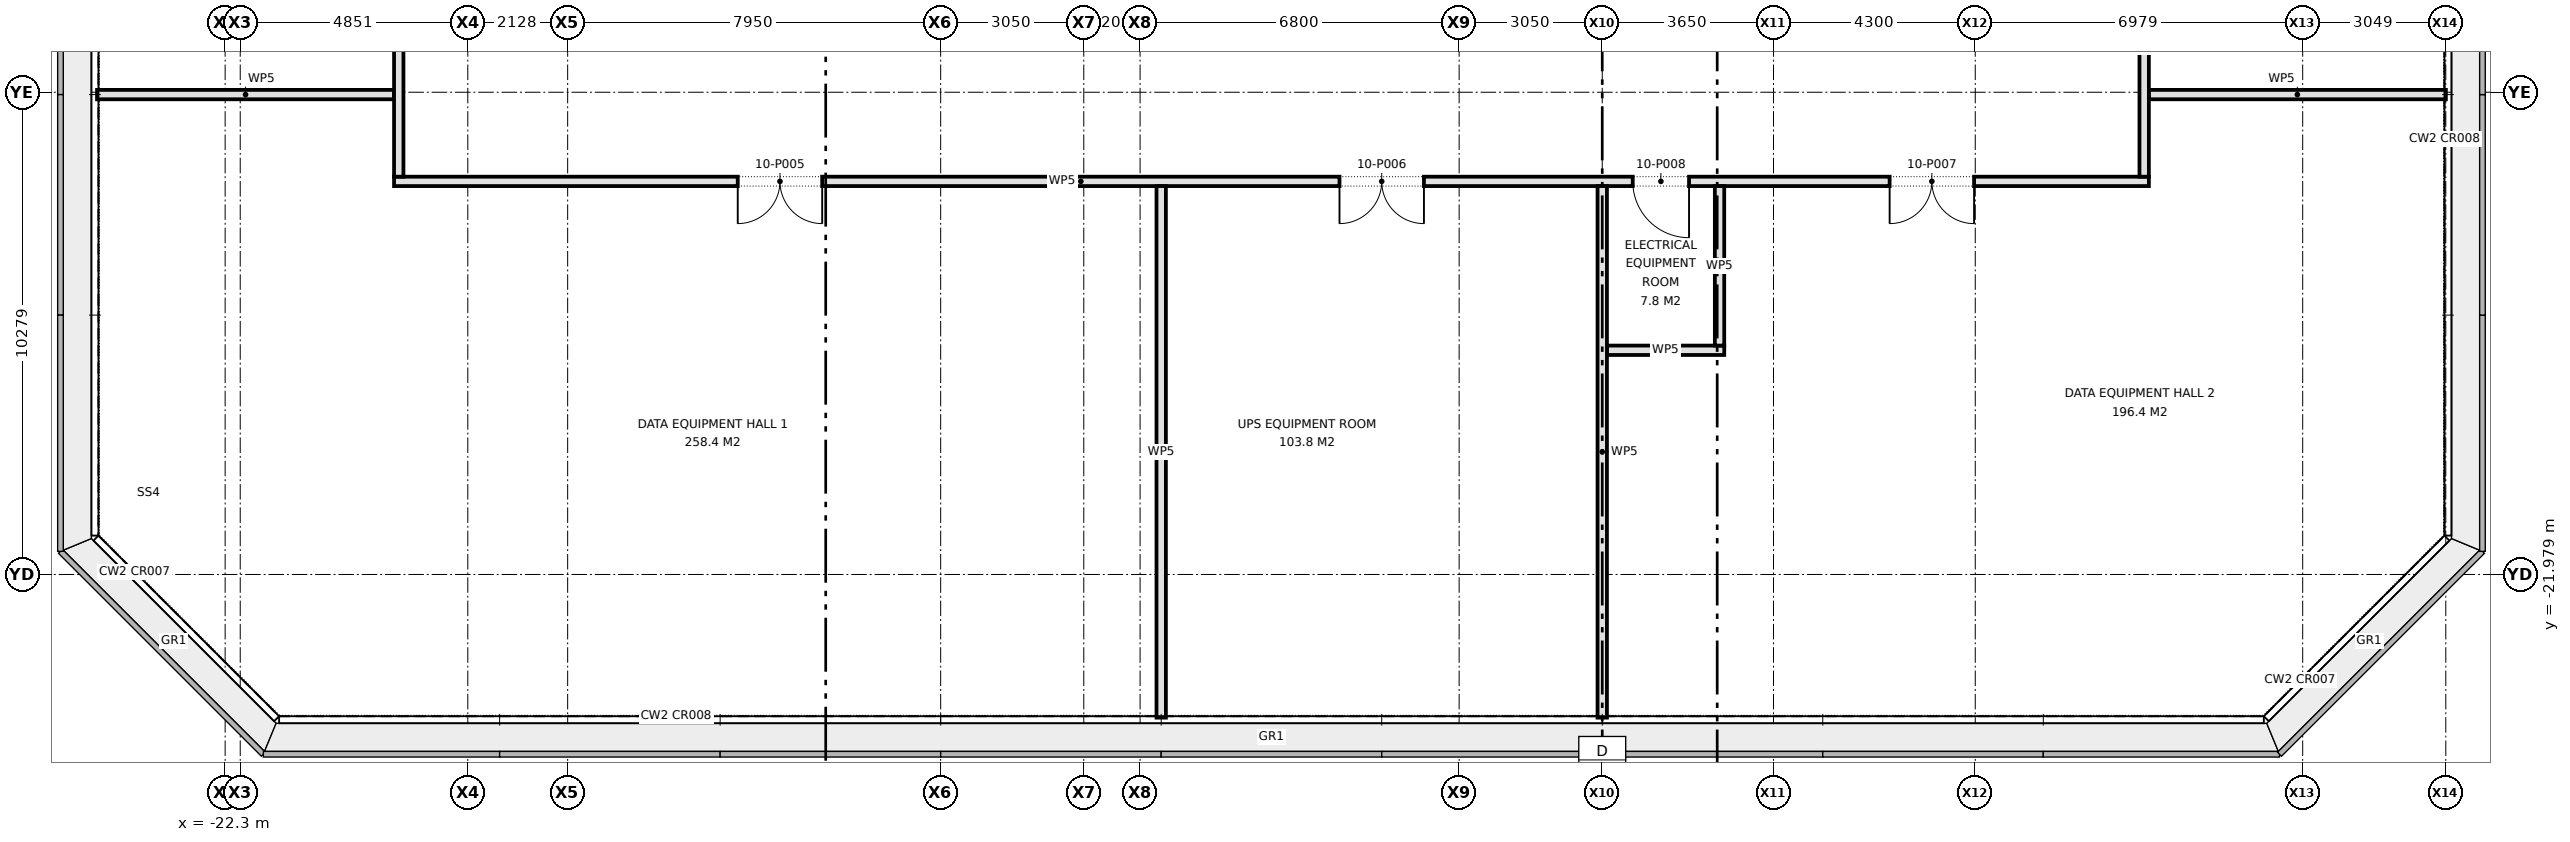
"""IFC4 building model, lengths in metres.
Left out: names, types, materials, properties, quantities, classifications, styles, units other than length and angle.
Written with IfcOpenShell. Run it as: python <this file> out.ifc"""

import sys

from ifc_helpers import new_model, si_unit, direction, frame, frame_2d, origin, place, context, subcontext, project, spatial, rectangle, extrude, element, fill, save


model = new_model("IFC4")
c1 = context("Model", 3, precision=1e-05, world=origin(), true_north=direction((0.0, 1.0)))
c2 = subcontext(c1, "Body", "Model", "MODEL_VIEW")
j1 = project(units=[si_unit("LENGTHUNIT", "METRE"), si_unit("PLANEANGLEUNIT", "RADIAN")], contexts=[c1])
p1 = place(None, origin())
s1 = spatial("IfcSite", under=j1, at=p1, CompositionType="ELEMENT")
p2 = place(p1, origin())
s2 = spatial("IfcBuilding", under=s1, at=p2, CompositionType="ELEMENT")
p3 = place(p2, frame((0.0, 0.0, 44.9)))
s3 = spatial("IfcBuildingStorey", under=s2, at=p3, CompositionType="ELEMENT", Elevation=44.9)
p4 = place(p3, frame((7.15, -17.2, 0.0), z_axis=(0.0, 0.0, 1.0), x_axis=(1.0, 0.0, 0.0)))
e1 = element("IfcWall", 1, at=p4, inside=s3, PredefinedType="PARTITIONING", context=c2, shape_type="SweptSolid", body=[
    extrude(rectangle(XDim=2.5, YDim=0.2, at=frame_2d((1.25, 0.0))), origin(), (0.0, 0.0, 1.0), 4.575),
])
p5 = place(p3, frame((-18.7, -13.6, 0.0), z_axis=(0.0, 0.0, 1.0), x_axis=(1.0, 0.0, 0.0)))
e2 = element("IfcWall", 2, at=p5, inside=s3, PredefinedType="PARTITIONING", context=c2, shape_type="SweptSolid", body=[
    extrude(rectangle(XDim=37.4, YDim=0.2, at=frame_2d((18.7, 0.0))), origin(), (0.0, 0.0, 1.0), 4.575),
])
p6 = place(p5, frame((7.325, 0.0, 0.0)))
e3 = element("IfcOpeningElement", 3, at=p6, cuts=e2, PredefinedType="OPENING", context=c2, shape_type="SweptSolid", body=[
    extrude(rectangle(XDim=1.8, YDim=2.1, at=frame_2d((0.9, 1.05))), frame((0.0, 0.11, 0.0), z_axis=(0.0, -1.0, 0.0), x_axis=(1.0, 0.0, 0.0)), (0.0, 0.0, 1.0), 0.22),
])
p7 = place(p5, frame((20.15, 0.0, 0.0)))
e4 = element("IfcOpeningElement", 4, at=p7, cuts=e2, PredefinedType="OPENING", context=c2, shape_type="SweptSolid", body=[
    extrude(rectangle(XDim=1.8, YDim=2.1, at=frame_2d((0.9, 1.05))), frame((0.0, 0.11, 0.0), z_axis=(0.0, -1.0, 0.0), x_axis=(1.0, 0.0, 0.0)), (0.0, 0.0, 1.0), 0.22),
])
p8 = place(p5, frame((31.875, 0.0, 0.0)))
e5 = element("IfcOpeningElement", 5, at=p8, cuts=e2, PredefinedType="OPENING", context=c2, shape_type="SweptSolid", body=[
    extrude(rectangle(XDim=1.8, YDim=2.1, at=frame_2d((0.9, 1.05))), frame((0.0, 0.11, 0.0), z_axis=(0.0, -1.0, 0.0), x_axis=(1.0, 0.0, 0.0)), (0.0, 0.0, 1.0), 0.22),
])
p9 = place(p5, frame((26.4, 0.0, 0.0)))
e6 = element("IfcOpeningElement", 6, at=p9, cuts=e2, PredefinedType="OPENING", context=c2, shape_type="SweptSolid", body=[
    extrude(rectangle(XDim=1.2, YDim=2.1, at=frame_2d((0.6, 1.05))), frame((0.0, 0.11, 0.0), z_axis=(0.0, -1.0, 0.0), x_axis=(1.0, 0.0, 0.0)), (0.0, 0.0, 1.0), 0.22),
])
for number, where, z_axis, x_axis in (
    (7, (-25.03, -11.75, 0.0), (0.0, 0.0, 1.0), (1.0, 0.0, 0.0)),
    (8, (18.7, -11.75, 0.0), (0.0, 0.0, 1.0), (1.0, 0.0, 0.0)),
):
    element("IfcWall", number, at=place(p3, frame(where, z_axis=z_axis, x_axis=x_axis)), inside=s3, PredefinedType="PARTITIONING", context=c2, shape_type="SweptSolid", body=[
        extrude(rectangle(XDim=6.33, YDim=0.2, at=frame_2d((3.165, 0.0))), origin(), (0.0, 0.0, 1.0), 4.575),
    ])
p10 = place(p3, frame((18.6, -13.5, 0.0), z_axis=(0.0, 0.0, 1.0), x_axis=(0.0, 1.0, 0.0)))
e9 = element("IfcWall", 9, at=p10, inside=s3, PredefinedType="PARTITIONING", context=c2, shape_type="SweptSolid", body=[
    extrude(rectangle(XDim=27.0, YDim=0.2, at=frame_2d((13.5, 0.0))), origin(), (0.0, 0.0, 1.0), 4.575),
])
p11 = place(p10, frame((5.55, 0.0, 0.0)))
e10 = element("IfcOpeningElement", 10, at=p11, cuts=e9, PredefinedType="OPENING", context=c2, shape_type="SweptSolid", body=[
    extrude(rectangle(XDim=1.8, YDim=2.1, at=frame_2d((0.9, 1.05))), frame((0.0, 0.11, 0.0), z_axis=(0.0, -1.0, 0.0), x_axis=(1.0, 0.0, 0.0)), (0.0, 0.0, 1.0), 0.22),
])
p12 = place(p10, frame((21.7, 0.0, 0.0)))
e11 = element("IfcOpeningElement", 11, at=p12, cuts=e9, PredefinedType="OPENING", context=c2, shape_type="SweptSolid", body=[
    extrude(rectangle(XDim=1.2, YDim=2.1, at=frame_2d((0.6, 1.05))), frame((0.0, 0.11, 0.0), z_axis=(0.0, -1.0, 0.0), x_axis=(1.0, 0.0, 0.0)), (0.0, 0.0, 1.0), 0.22),
])
p13 = place(p10, frame((12.15, 0.0, 0.0)))
e12 = element("IfcOpeningElement", 12, at=p13, cuts=e9, PredefinedType="OPENING", context=c2, shape_type="SweptSolid", body=[
    extrude(rectangle(XDim=1.0, YDim=2.1, at=frame_2d((0.5, 1.05))), frame((0.0, 0.11, 0.0), z_axis=(0.0, -1.0, 0.0), x_axis=(1.0, 0.0, 0.0)), (0.0, 0.0, 1.0), 0.22),
])
p14 = place(p10, frame((15.15, 0.0, 0.0)))
e13 = element("IfcOpeningElement", 13, at=p14, cuts=e9, PredefinedType="OPENING", context=c2, shape_type="SweptSolid", body=[
    extrude(rectangle(XDim=1.0, YDim=2.1, at=frame_2d((0.5, 1.05))), frame((0.0, 0.11, 0.0), z_axis=(0.0, -1.0, 0.0), x_axis=(1.0, 0.0, 0.0)), (0.0, 0.0, 1.0), 0.22),
])
p15 = place(p10, frame((17.75, 0.0, 0.0)))
e14 = element("IfcOpeningElement", 14, at=p15, cuts=e9, PredefinedType="OPENING", context=c2, shape_type="SweptSolid", body=[
    extrude(rectangle(XDim=1.0, YDim=2.1, at=frame_2d((0.5, 1.05))), frame((0.0, 0.11, 0.0), z_axis=(0.0, -1.0, 0.0), x_axis=(1.0, 0.0, 0.0)), (0.0, 0.0, 1.0), 0.22),
])
p16 = place(p3, frame((9.55, -17.1, 0.0), z_axis=(0.0, 0.0, 1.0), x_axis=(0.0, 1.0, 0.0)))
e15 = element("IfcWall", 15, at=p16, inside=s3, PredefinedType="PARTITIONING", context=c2, shape_type="SweptSolid", body=[
    extrude(rectangle(XDim=3.4, YDim=0.2, at=frame_2d((1.7, 0.0))), origin(), (0.0, 0.0, 1.0), 4.575),
])
for number, where, z_axis, x_axis in (
    (16, (7.05, -25.03, 0.0), (0.0, 0.0, 1.0), (0.0, 1.0, 0.0)),
    (17, (-2.35, -25.03, 0.0), (0.0, 0.0, 1.0), (0.0, 1.0, 0.0)),
):
    element("IfcWall", number, at=place(p3, frame(where, z_axis=z_axis, x_axis=x_axis)), inside=s3, PredefinedType="PARTITIONING", context=c2, shape_type="SweptSolid", body=[
        extrude(rectangle(XDim=11.33, YDim=0.2, at=frame_2d((5.665, 0.0))), origin(), (0.0, 0.0, 1.0), 4.575),
    ])
p17 = place(p3, frame((-18.6, -13.5, 0.0), z_axis=(0.0, 0.0, 1.0), x_axis=(0.0, 1.0, 0.0)))
e18 = element("IfcWall", 18, at=p17, inside=s3, PredefinedType="PARTITIONING", context=c2, shape_type="SweptSolid", body=[
    extrude(rectangle(XDim=27.0, YDim=0.2, at=frame_2d((13.5, 0.0))), origin(), (0.0, 0.0, 1.0), 4.575),
])
p18 = place(p17, frame((12.6, 0.0, 0.0)))
e19 = element("IfcOpeningElement", 19, at=p18, cuts=e18, PredefinedType="OPENING", context=c2, shape_type="SweptSolid", body=[
    extrude(rectangle(XDim=1.8, YDim=2.1, at=frame_2d((0.9, 1.05))), frame((0.0, 0.11, 0.0), z_axis=(0.0, -1.0, 0.0), x_axis=(1.0, 0.0, 0.0)), (0.0, 0.0, 1.0), 0.22),
])
p19 = place(p6, frame((1.8, 0.0, 0.0), z_axis=(0.0, 0.0, 1.0), x_axis=(-1.0, 0.0, 0.0)))
e20 = element("IfcDoor", 20, at=p19, inside=s3, OperationType="DOUBLE_DOOR_SINGLE_SWING", PredefinedType="DOOR", context=c2, shape_type="SweptSolid", body=[
    extrude(rectangle(XDim=1.8, YDim=2.1, at=frame_2d((0.9, 1.05))), frame((0.0, 0.025, 0.0), z_axis=(0.0, -1.0, 0.0), x_axis=(1.0, 0.0, 0.0)), (0.0, 0.0, 1.0), 0.05),
])
fill(e3, e20)
p20 = place(p7, frame((1.8, 0.0, 0.0), z_axis=(0.0, 0.0, 1.0), x_axis=(-1.0, 0.0, 0.0)))
e21 = element("IfcDoor", 21, at=p20, inside=s3, OperationType="DOUBLE_DOOR_SINGLE_SWING", PredefinedType="DOOR", context=c2, shape_type="SweptSolid", body=[
    extrude(rectangle(XDim=1.8, YDim=2.1, at=frame_2d((0.9, 1.05))), frame((0.0, 0.025, 0.0), z_axis=(0.0, -1.0, 0.0), x_axis=(1.0, 0.0, 0.0)), (0.0, 0.0, 1.0), 0.05),
])
fill(e4, e21)
p21 = place(p8, frame((1.8, 0.0, 0.0), z_axis=(0.0, 0.0, 1.0), x_axis=(-1.0, 0.0, 0.0)))
e22 = element("IfcDoor", 22, at=p21, inside=s3, OperationType="DOUBLE_DOOR_SINGLE_SWING", PredefinedType="DOOR", context=c2, shape_type="SweptSolid", body=[
    extrude(rectangle(XDim=1.8, YDim=2.1, at=frame_2d((0.9, 1.05))), frame((0.0, 0.025, 0.0), z_axis=(0.0, -1.0, 0.0), x_axis=(1.0, 0.0, 0.0)), (0.0, 0.0, 1.0), 0.05),
])
fill(e5, e22)
p22 = place(p9, frame((1.2, 0.0, 0.0), z_axis=(0.0, 0.0, 1.0), x_axis=(-1.0, 0.0, 0.0)))
e23 = element("IfcDoor", 23, at=p22, inside=s3, OperationType="SINGLE_SWING_LEFT", PredefinedType="DOOR", context=c2, shape_type="SweptSolid", body=[
    extrude(rectangle(XDim=1.2, YDim=2.1, at=frame_2d((0.6, 1.05))), frame((0.0, 0.025, 0.0), z_axis=(0.0, -1.0, 0.0), x_axis=(1.0, 0.0, 0.0)), (0.0, 0.0, 1.0), 0.05),
])
fill(e6, e23)
save(model, sys.argv[1])
